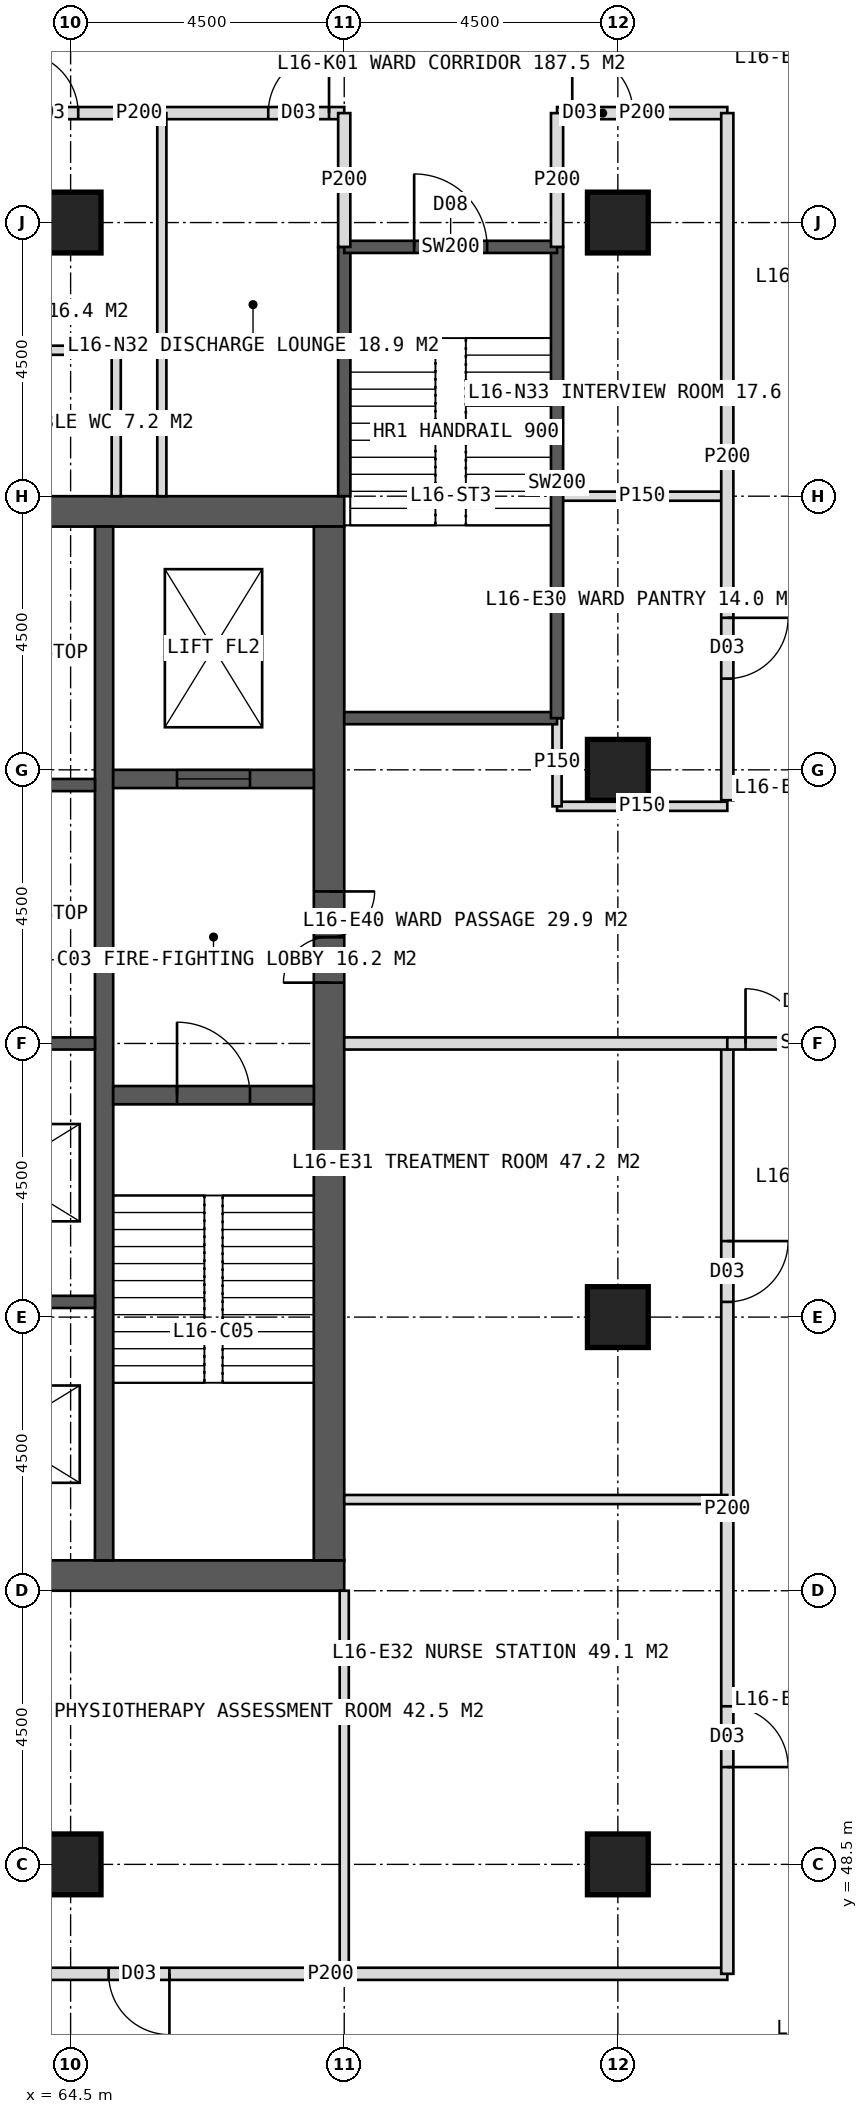
"""IFC4 building model, lengths in metres.
Left out: names, types, materials, properties, quantities, classifications, styles, units other than length and angle.
Written with IfcOpenShell. Run it as: python <this file> out.ifc"""

import sys

from ifc_helpers import new_model, si_unit, direction, frame, frame_2d, origin, origin_2d, place, context, subcontext, project, spatial, rectangle, hollow_rectangle, extrude, element, fill, save


model = new_model("IFC4")
c1 = context("Model", 3, precision=1e-05, world=origin(), true_north=direction((0.0, 1.0)))
c2 = subcontext(c1, "Body", "Model", "MODEL_VIEW")
j1 = project(units=[si_unit("LENGTHUNIT", "METRE"), si_unit("PLANEANGLEUNIT", "RADIAN")], contexts=[c1])
p1 = place(None, origin())
s1 = spatial("IfcSite", under=j1, at=p1, CompositionType="ELEMENT")
p2 = place(p1, origin())
s2 = spatial("IfcBuilding", under=s1, at=p2, CompositionType="ELEMENT")
p3 = place(p2, frame((0.0, 0.0, 71.0)))
s3 = spatial("IfcBuildingStorey", under=s2, at=p3, CompositionType="ELEMENT", Elevation=71.0)
p4 = place(p3, frame((51.0, 70.75, 0.0), z_axis=(0.0, 0.0, 1.0), x_axis=(1.0, 0.0, 0.0)))
e1 = element("IfcWall", 1, at=p4, inside=s3, PredefinedType="SHEAR", context=c2, shape_type="SweptSolid", body=[
    extrude(rectangle(XDim=18.0, YDim=0.5, at=frame_2d((9.0, 0.0))), origin(), (0.0, 0.0, 1.0), 4.0),
])
p5 = place(p4, frame((8.1, 0.0, 0.0)))
e2 = element("IfcOpeningElement", 2, at=p5, cuts=e1, PredefinedType="OPENING", context=c2, shape_type="SweptSolid", body=[
    extrude(rectangle(XDim=1.8, YDim=2.2, at=frame_2d((0.9, 1.1))), frame((0.0, 0.26, 0.0), z_axis=(0.0, -1.0, 0.0), x_axis=(1.0, 0.0, 0.0)), (0.0, 0.0, 1.0), 0.52),
])
p6 = place(p3, frame((51.0, 53.25, 0.0), z_axis=(0.0, 0.0, 1.0), x_axis=(1.0, 0.0, 0.0)))
e3 = element("IfcWall", 3, at=p6, inside=s3, PredefinedType="SHEAR", context=c2, shape_type="SweptSolid", body=[
    extrude(rectangle(XDim=18.0, YDim=0.5, at=frame_2d((9.0, 0.0))), origin(), (0.0, 0.0, 1.0), 4.0),
])
p7 = place(p6, frame((8.1, 0.0, 0.0)))
e4 = element("IfcOpeningElement", 4, at=p7, cuts=e3, PredefinedType="OPENING", context=c2, shape_type="SweptSolid", body=[
    extrude(rectangle(XDim=1.8, YDim=2.2, at=frame_2d((0.9, 1.1))), frame((0.0, 0.26, 0.0), z_axis=(0.0, -1.0, 0.0), x_axis=(1.0, 0.0, 0.0)), (0.0, 0.0, 1.0), 0.52),
])
p8 = place(p3, frame((68.75, 53.5, 0.0), z_axis=(0.0, 0.0, 1.0), x_axis=(0.0, 1.0, 0.0)))
e5 = element("IfcWall", 5, at=p8, inside=s3, PredefinedType="SHEAR", context=c2, shape_type="SweptSolid", body=[
    extrude(rectangle(XDim=17.0, YDim=0.5, at=frame_2d((8.5, 0.0))), origin(), (0.0, 0.0, 1.0), 4.0),
])
p9 = place(p8, frame((9.5, 0.0, 0.0)))
e6 = element("IfcOpeningElement", 6, at=p9, cuts=e5, PredefinedType="OPENING", context=c2, shape_type="SweptSolid", body=[
    extrude(rectangle(XDim=1.5, YDim=2.2, at=frame_2d((0.75, 1.1))), frame((0.0, 0.26, 0.0), z_axis=(0.0, -1.0, 0.0), x_axis=(1.0, 0.0, 0.0)), (0.0, 0.0, 1.0), 0.52),
])
p10 = place(p3, frame((65.05, 53.5, 0.0), z_axis=(0.0, 0.0, 1.0), x_axis=(0.0, 1.0, 0.0)))
e7 = element("IfcWall", 7, at=p10, inside=s3, PredefinedType="SHEAR", context=c2, shape_type="SweptSolid", body=[
    extrude(rectangle(XDim=17.0, YDim=0.3, at=frame_2d((8.5, 0.0))), origin(), (0.0, 0.0, 1.0), 4.0),
])
for number, where, z_axis, x_axis in (
    (8, (61.85, 57.75, 0.0), (0.0, 0.0, 1.0), (1.0, 0.0, 0.0)),
    (9, (61.85, 62.0, 0.0), (0.0, 0.0, 1.0), (1.0, 0.0, 0.0)),
    (10, (61.85, 66.25, 0.0), (0.0, 0.0, 1.0), (1.0, 0.0, 0.0)),
):
    element("IfcWall", number, at=place(p3, frame(where, z_axis=z_axis, x_axis=x_axis)), inside=s3, PredefinedType="SHEAR", context=c2, shape_type="SweptSolid", body=[
        extrude(rectangle(XDim=3.05, YDim=0.2, at=frame_2d((1.525, 0.0))), origin(), (0.0, 0.0, 1.0), 4.0),
    ])
p11 = place(p3, frame((65.2, 61.15, 0.0), z_axis=(0.0, 0.0, 1.0), x_axis=(1.0, 0.0, 0.0)))
e11 = element("IfcWall", 11, at=p11, inside=s3, PredefinedType="SHEAR", context=c2, shape_type="SweptSolid", body=[
    extrude(rectangle(XDim=3.3, YDim=0.3, at=frame_2d((1.65, 0.0))), origin(), (0.0, 0.0, 1.0), 4.0),
])
p12 = place(p11, frame((1.05, 0.0, 0.0)))
e12 = element("IfcOpeningElement", 12, at=p12, cuts=e11, PredefinedType="OPENING", context=c2, shape_type="SweptSolid", body=[
    extrude(rectangle(XDim=1.2, YDim=2.1, at=frame_2d((0.6, 1.05))), frame((0.0, 0.16, 0.0), z_axis=(0.0, -1.0, 0.0), x_axis=(1.0, 0.0, 0.0)), (0.0, 0.0, 1.0), 0.32),
])
p13 = place(p3, frame((65.2, 66.35, 0.0), z_axis=(0.0, 0.0, 1.0), x_axis=(1.0, 0.0, 0.0)))
e13 = element("IfcWall", 13, at=p13, inside=s3, PredefinedType="SHEAR", context=c2, shape_type="SweptSolid", body=[
    extrude(rectangle(XDim=3.3, YDim=0.3, at=frame_2d((1.65, 0.0))), origin(), (0.0, 0.0, 1.0), 4.0),
])
p14 = place(p13, frame((1.05, 0.0, 0.0)))
e14 = element("IfcOpeningElement", 14, at=p14, cuts=e13, PredefinedType="OPENING", context=c2, shape_type="SweptSolid", body=[
    extrude(rectangle(XDim=1.2, YDim=2.2, at=frame_2d((0.6, 1.1))), frame((0.0, 0.16, 0.0), z_axis=(0.0, -1.0, 0.0), x_axis=(1.0, 0.0, 0.0)), (0.0, 0.0, 1.0), 0.32),
])
for number, where, z_axis, x_axis in (
    (15, (73.5, 48.5, 0.0), (0.0, 0.0, 1.0), (1.0, 0.0, 0.0)),
    (16, (73.5, 75.5, 0.0), (0.0, 0.0, 1.0), (1.0, 0.0, 0.0)),
    (17, (64.5, 48.5, 0.0), (0.0, 0.0, 1.0), (1.0, 0.0, 0.0)),
    (18, (64.5, 75.5, 0.0), (0.0, 0.0, 1.0), (1.0, 0.0, 0.0)),
    (19, (73.5, 57.5, 0.0), (0.0, 0.0, 1.0), (1.0, 0.0, 0.0)),
    (20, (73.5, 66.5, 0.0), (0.0, 0.0, 1.0), (1.0, 0.0, 0.0)),
):
    element("IfcColumn", number, at=place(p3, frame(where, z_axis=z_axis, x_axis=x_axis)), inside=s3, PredefinedType="COLUMN", context=c2, shape_type="SweptSolid", body=[
        extrude(hollow_rectangle(XDim=1.0, YDim=1.0, WallThickness=0.1, at=origin_2d()), origin(), (0.0, 0.0, 1.0), 4.0),
    ])
p15 = place(p3, frame((62.25, 77.3, 0.0), z_axis=(0.0, 0.0, 1.0), x_axis=(1.0, 0.0, 0.0)))
e21 = element("IfcWall", 21, at=p15, inside=s3, PredefinedType="PARTITIONING", context=c2, shape_type="SweptSolid", body=[
    extrude(rectangle(XDim=6.75, YDim=0.2, at=frame_2d((3.375, 0.0))), origin(), (0.0, 0.0, 1.0), 3.75),
])
p16 = place(p15, frame((1.375, 0.0, 0.0)))
e22 = element("IfcOpeningElement", 22, at=p16, cuts=e21, PredefinedType="OPENING", context=c2, shape_type="SweptSolid", body=[
    extrude(rectangle(XDim=1.0, YDim=2.1, at=frame_2d((0.5, 1.05))), frame((0.0, 0.11, 0.0), z_axis=(0.0, -1.0, 0.0), x_axis=(1.0, 0.0, 0.0)), (0.0, 0.0, 1.0), 0.22),
])
p17 = place(p15, frame((5.5, 0.0, 0.0)))
e23 = element("IfcOpeningElement", 23, at=p17, cuts=e21, PredefinedType="OPENING", context=c2, shape_type="SweptSolid", body=[
    extrude(rectangle(XDim=1.0, YDim=2.1, at=frame_2d((0.5, 1.05))), frame((0.0, 0.11, 0.0), z_axis=(0.0, -1.0, 0.0), x_axis=(1.0, 0.0, 0.0)), (0.0, 0.0, 1.0), 0.22),
])
p18 = place(p3, frame((72.5, 77.3, 0.0), z_axis=(0.0, 0.0, 1.0), x_axis=(1.0, 0.0, 0.0)))
e24 = element("IfcWall", 24, at=p18, inside=s3, PredefinedType="PARTITIONING", context=c2, shape_type="SweptSolid", body=[
    extrude(rectangle(XDim=2.8, YDim=0.2, at=frame_2d((1.4, 0.0))), origin(), (0.0, 0.0, 1.0), 3.75),
])
p19 = place(p18, frame((0.25, 0.0, 0.0)))
e25 = element("IfcOpeningElement", 25, at=p19, cuts=e24, PredefinedType="OPENING", context=c2, shape_type="SweptSolid", body=[
    extrude(rectangle(XDim=1.0, YDim=2.1, at=frame_2d((0.5, 1.05))), frame((0.0, 0.11, 0.0), z_axis=(0.0, -1.0, 0.0), x_axis=(1.0, 0.0, 0.0)), (0.0, 0.0, 1.0), 0.22),
])
p20 = place(p3, frame((66.0, 71.0, 0.0), z_axis=(0.0, 0.0, 1.0), x_axis=(0.0, 1.0, 0.0)))
e26 = element("IfcWall", 26, at=p20, inside=s3, PredefinedType="PARTITIONING", context=c2, shape_type="SweptSolid", body=[
    extrude(rectangle(XDim=6.3, YDim=0.15, at=frame_2d((3.15, 0.0))), origin(), (0.0, 0.0, 1.0), 3.75),
])
p21 = place(p3, frame((62.25, 73.4, 0.0), z_axis=(0.0, 0.0, 1.0), x_axis=(1.0, 0.0, 0.0)))
e27 = element("IfcWall", 27, at=p21, inside=s3, PredefinedType="PARTITIONING", context=c2, shape_type="SweptSolid", body=[
    extrude(rectangle(XDim=3.0, YDim=0.15, at=frame_2d((1.5, 0.0))), origin(), (0.0, 0.0, 1.0), 3.75),
])
p22 = place(p3, frame((65.25, 71.0, 0.0), z_axis=(0.0, 0.0, 1.0), x_axis=(0.0, 1.0, 0.0)))
e28 = element("IfcWall", 28, at=p22, inside=s3, PredefinedType="PARTITIONING", context=c2, shape_type="SweptSolid", body=[
    extrude(rectangle(XDim=2.4, YDim=0.15, at=frame_2d((1.2, 0.0))), origin(), (0.0, 0.0, 1.0), 3.75),
])
p23 = place(p3, frame((69.0, 53.0, 0.0), z_axis=(0.0, 0.0, 1.0), x_axis=(0.0, -1.0, 0.0)))
e29 = element("IfcWall", 29, at=p23, inside=s3, PredefinedType="PARTITIONING", context=c2, shape_type="SweptSolid", body=[
    extrude(rectangle(XDim=6.3, YDim=0.15, at=frame_2d((3.15, 0.0))), origin(), (0.0, 0.0, 1.0), 3.75),
])
p24 = place(p3, frame((75.3, 46.7, 0.0), z_axis=(0.0, 0.0, 1.0), x_axis=(-1.0, 0.0, 0.0)))
e30 = element("IfcWall", 30, at=p24, inside=s3, PredefinedType="PARTITIONING", context=c2, shape_type="SweptSolid", body=[
    extrude(rectangle(XDim=13.05, YDim=0.2, at=frame_2d((6.525, 0.0))), origin(), (0.0, 0.0, 1.0), 3.75),
])
p25 = place(p24, frame((9.175, 0.0, 0.0)))
e31 = element("IfcOpeningElement", 31, at=p25, cuts=e30, PredefinedType="OPENING", context=c2, shape_type="SweptSolid", body=[
    extrude(rectangle(XDim=1.0, YDim=2.1, at=frame_2d((0.5, 1.05))), frame((0.0, 0.11, 0.0), z_axis=(0.0, -1.0, 0.0), x_axis=(1.0, 0.0, 0.0)), (0.0, 0.0, 1.0), 0.22),
])
p26 = place(p3, frame((72.5, 71.0, 0.0), z_axis=(0.0, 0.0, 1.0), x_axis=(1.0, 0.0, 0.0)))
e32 = element("IfcWall", 32, at=p26, inside=s3, PredefinedType="PARTITIONING", context=c2, shape_type="SweptSolid", body=[
    extrude(rectangle(XDim=2.8, YDim=0.15, at=frame_2d((1.4, 0.0))), origin(), (0.0, 0.0, 1.0), 3.75),
])
p27 = place(p3, frame((75.3, 77.3, 0.0), z_axis=(0.0, 0.0, 1.0), x_axis=(0.0, -1.0, 0.0)))
e33 = element("IfcWall", 33, at=p27, inside=s3, PredefinedType="PARTITIONING", context=c2, shape_type="SweptSolid", body=[
    extrude(rectangle(XDim=11.3, YDim=0.2, at=frame_2d((5.65, 0.0))), origin(), (0.0, 0.0, 1.0), 3.75),
])
p28 = place(p27, frame((8.3, 0.0, 0.0)))
e34 = element("IfcOpeningElement", 34, at=p28, cuts=e33, PredefinedType="OPENING", context=c2, shape_type="SweptSolid", body=[
    extrude(rectangle(XDim=1.0, YDim=2.1, at=frame_2d((0.5, 1.05))), frame((0.0, 0.11, 0.0), z_axis=(0.0, -1.0, 0.0), x_axis=(1.0, 0.0, 0.0)), (0.0, 0.0, 1.0), 0.22),
])
p29 = place(p3, frame((75.3, 62.0, 0.0), z_axis=(0.0, 0.0, 1.0), x_axis=(0.0, -1.0, 0.0)))
e35 = element("IfcWall", 35, at=p29, inside=s3, PredefinedType="PARTITIONING", context=c2, shape_type="SweptSolid", body=[
    extrude(rectangle(XDim=15.3, YDim=0.2, at=frame_2d((7.65, 0.0))), origin(), (0.0, 0.0, 1.0), 3.75),
])
p30 = place(p29, frame((3.25, 0.0, 0.0)))
e36 = element("IfcOpeningElement", 36, at=p30, cuts=e35, PredefinedType="OPENING", context=c2, shape_type="SweptSolid", body=[
    extrude(rectangle(XDim=1.0, YDim=2.1, at=frame_2d((0.5, 1.05))), frame((0.0, 0.11, 0.0), z_axis=(0.0, -1.0, 0.0), x_axis=(1.0, 0.0, 0.0)), (0.0, 0.0, 1.0), 0.22),
])
p31 = place(p29, frame((10.9, 0.0, 0.0)))
e37 = element("IfcOpeningElement", 37, at=p31, cuts=e35, PredefinedType="OPENING", context=c2, shape_type="SweptSolid", body=[
    extrude(rectangle(XDim=1.0, YDim=2.1, at=frame_2d((0.5, 1.05))), frame((0.0, 0.11, 0.0), z_axis=(0.0, -1.0, 0.0), x_axis=(1.0, 0.0, 0.0)), (0.0, 0.0, 1.0), 0.22),
])
p32 = place(p3, frame((72.5, 65.9, 0.0), z_axis=(0.0, 0.0, 1.0), x_axis=(1.0, 0.0, 0.0)))
e38 = element("IfcWall", 38, at=p32, inside=s3, PredefinedType="PARTITIONING", context=c2, shape_type="SweptSolid", body=[
    extrude(rectangle(XDim=2.8, YDim=0.15, at=frame_2d((1.4, 0.0))), origin(), (0.0, 0.0, 1.0), 3.75),
])
p33 = place(p3, frame((69.0, 62.0, 0.0), z_axis=(0.0, 0.0, 1.0), x_axis=(1.0, 0.0, 0.0)))
e39 = element("IfcWall", 39, at=p33, inside=s3, PredefinedType="SOLIDWALL", context=c2, shape_type="SweptSolid", body=[
    extrude(rectangle(XDim=6.3, YDim=0.2, at=frame_2d((3.15, 0.0))), origin(), (0.0, 0.0, 1.0), 2.75),
])
p34 = place(p3, frame((69.0, 54.5, 0.0), z_axis=(0.0, 0.0, 1.0), x_axis=(1.0, 0.0, 0.0)))
e40 = element("IfcWall", 40, at=p34, inside=s3, PredefinedType="PARTITIONING", context=c2, shape_type="SweptSolid", body=[
    extrude(rectangle(XDim=6.3, YDim=0.15, at=frame_2d((3.15, 0.0))), origin(), (0.0, 0.0, 1.0), 3.75),
])
p35 = place(p3, frame((75.3, 62.0, 0.0), z_axis=(0.0, 0.0, 1.0), x_axis=(1.0, 0.0, 0.0)))
e41 = element("IfcWall", 41, at=p35, inside=s3, PredefinedType="SOLIDWALL", context=c2, shape_type="SweptSolid", body=[
    extrude(rectangle(XDim=2.7, YDim=0.2, at=frame_2d((1.35, 0.0))), origin(), (0.0, 0.0, 1.0), 2.75),
])
p36 = place(p35, frame((0.3, 0.0, 0.0)))
e42 = element("IfcOpeningElement", 42, at=p36, cuts=e41, PredefinedType="OPENING", context=c2, shape_type="SweptSolid", body=[
    extrude(rectangle(XDim=1.8, YDim=2.2, at=frame_2d((0.9, 1.1))), frame((0.0, 0.11, 0.0), z_axis=(0.0, -1.0, 0.0), x_axis=(1.0, 0.0, 0.0)), (0.0, 0.0, 1.0), 0.22),
])
p37 = place(p3, frame((72.5, 65.9, 0.0), z_axis=(0.0, 0.0, 1.0), x_axis=(0.0, 1.0, 0.0)))
e43 = element("IfcWall", 43, at=p37, inside=s3, PredefinedType="PARTITIONING", context=c2, shape_type="SweptSolid", body=[
    extrude(rectangle(XDim=1.45, YDim=0.15, at=frame_2d((0.725, 0.0))), origin(), (0.0, 0.0, 1.0), 3.75),
])
p38 = place(p3, frame((69.0, 71.0, 0.0), z_axis=(0.0, 0.0, 1.0), x_axis=(0.0, 1.0, 0.0)))
e44 = element("IfcWall", 44, at=p38, inside=s3, PredefinedType="SOLIDWALL", context=c2, shape_type="SweptSolid", body=[
    extrude(rectangle(XDim=4.1, YDim=0.2, at=frame_2d((2.05, 0.0))), origin(), (0.0, 0.0, 1.0), 3.75),
])
p39 = place(p3, frame((69.0, 67.35, 0.0), z_axis=(0.0, 0.0, 1.0), x_axis=(1.0, 0.0, 0.0)))
e45 = element("IfcWall", 45, at=p39, inside=s3, PredefinedType="SOLIDWALL", context=c2, shape_type="SweptSolid", body=[
    extrude(rectangle(XDim=3.5, YDim=0.2, at=frame_2d((1.75, 0.0))), origin(), (0.0, 0.0, 1.0), 3.75),
])
p40 = place(p3, frame((72.5, 67.35, 0.0), z_axis=(0.0, 0.0, 1.0), x_axis=(0.0, 1.0, 0.0)))
e46 = element("IfcWall", 46, at=p40, inside=s3, PredefinedType="SOLIDWALL", context=c2, shape_type="SweptSolid", body=[
    extrude(rectangle(XDim=7.75, YDim=0.2, at=frame_2d((3.875, 0.0))), origin(), (0.0, 0.0, 1.0), 3.75),
])
p41 = place(p3, frame((69.0, 75.1, 0.0), z_axis=(0.0, 0.0, 1.0), x_axis=(1.0, 0.0, 0.0)))
e47 = element("IfcWall", 47, at=p41, inside=s3, PredefinedType="SOLIDWALL", context=c2, shape_type="SweptSolid", body=[
    extrude(rectangle(XDim=3.5, YDim=0.2, at=frame_2d((1.75, 0.0))), origin(), (0.0, 0.0, 1.0), 3.75),
])
p42 = place(p41, frame((1.15, 0.0, 0.0)))
e48 = element("IfcOpeningElement", 48, at=p42, cuts=e47, PredefinedType="OPENING", context=c2, shape_type="SweptSolid", body=[
    extrude(rectangle(XDim=1.2, YDim=2.1, at=frame_2d((0.6, 1.05))), frame((0.0, 0.11, 0.0), z_axis=(0.0, -1.0, 0.0), x_axis=(1.0, 0.0, 0.0)), (0.0, 0.0, 1.0), 0.22),
])
for number, where, z_axis, x_axis in (
    (49, (69.0, 75.1, 0.0), (0.0, 0.0, 1.0), (0.0, 1.0, 0.0)),
    (50, (72.5, 75.1, 0.0), (0.0, 0.0, 1.0), (0.0, 1.0, 0.0)),
):
    element("IfcWall", number, at=place(p3, frame(where, z_axis=z_axis, x_axis=x_axis)), inside=s3, PredefinedType="PARTITIONING", context=c2, shape_type="SweptSolid", body=[
        extrude(rectangle(XDim=2.2, YDim=0.2, at=frame_2d((1.1, 0.0))), origin(), (0.0, 0.0, 1.0), 3.75),
    ])
p43 = place(p16, origin())
e51 = element("IfcDoor", 51, at=p43, inside=s3, OperationType="SINGLE_SWING_LEFT", PredefinedType="DOOR", context=c2, shape_type="SweptSolid", body=[
    extrude(rectangle(XDim=1.0, YDim=2.1, at=frame_2d((0.5, 1.05))), frame((0.0, 0.025, 0.0), z_axis=(0.0, -1.0, 0.0), x_axis=(1.0, 0.0, 0.0)), (0.0, 0.0, 1.0), 0.05),
])
fill(e22, e51)
p44 = place(p17, origin())
e52 = element("IfcDoor", 52, at=p44, inside=s3, OperationType="SINGLE_SWING_RIGHT", PredefinedType="DOOR", context=c2, shape_type="SweptSolid", body=[
    extrude(rectangle(XDim=1.0, YDim=2.1, at=frame_2d((0.5, 1.05))), frame((0.0, 0.025, 0.0), z_axis=(0.0, -1.0, 0.0), x_axis=(1.0, 0.0, 0.0)), (0.0, 0.0, 1.0), 0.05),
])
fill(e23, e52)
p45 = place(p19, origin())
e53 = element("IfcDoor", 53, at=p45, inside=s3, OperationType="SINGLE_SWING_LEFT", PredefinedType="DOOR", context=c2, shape_type="SweptSolid", body=[
    extrude(rectangle(XDim=1.0, YDim=2.1, at=frame_2d((0.5, 1.05))), frame((0.0, 0.025, 0.0), z_axis=(0.0, -1.0, 0.0), x_axis=(1.0, 0.0, 0.0)), (0.0, 0.0, 1.0), 0.05),
])
fill(e25, e53)
p46 = place(p25, origin())
e54 = element("IfcDoor", 54, at=p46, inside=s3, OperationType="SINGLE_SWING_LEFT", PredefinedType="DOOR", context=c2, shape_type="SweptSolid", body=[
    extrude(rectangle(XDim=1.0, YDim=2.1, at=frame_2d((0.5, 1.05))), frame((0.0, 0.025, 0.0), z_axis=(0.0, -1.0, 0.0), x_axis=(1.0, 0.0, 0.0)), (0.0, 0.0, 1.0), 0.05),
])
fill(e31, e54)
p47 = place(p28, origin())
e55 = element("IfcDoor", 55, at=p47, inside=s3, OperationType="SINGLE_SWING_LEFT", PredefinedType="DOOR", context=c2, shape_type="SweptSolid", body=[
    extrude(rectangle(XDim=1.0, YDim=2.1, at=frame_2d((0.5, 1.05))), frame((0.0, 0.025, 0.0), z_axis=(0.0, -1.0, 0.0), x_axis=(1.0, 0.0, 0.0)), (0.0, 0.0, 1.0), 0.05),
])
fill(e34, e55)
p48 = place(p30, origin())
e56 = element("IfcDoor", 56, at=p48, inside=s3, OperationType="SINGLE_SWING_LEFT", PredefinedType="DOOR", context=c2, shape_type="SweptSolid", body=[
    extrude(rectangle(XDim=1.0, YDim=2.1, at=frame_2d((0.5, 1.05))), frame((0.0, 0.025, 0.0), z_axis=(0.0, -1.0, 0.0), x_axis=(1.0, 0.0, 0.0)), (0.0, 0.0, 1.0), 0.05),
])
fill(e36, e56)
p49 = place(p31, origin())
e57 = element("IfcDoor", 57, at=p49, inside=s3, OperationType="SINGLE_SWING_RIGHT", PredefinedType="DOOR", context=c2, shape_type="SweptSolid", body=[
    extrude(rectangle(XDim=1.0, YDim=2.1, at=frame_2d((0.5, 1.05))), frame((0.0, 0.025, 0.0), z_axis=(0.0, -1.0, 0.0), x_axis=(1.0, 0.0, 0.0)), (0.0, 0.0, 1.0), 0.05),
])
fill(e37, e57)
p50 = place(p36, origin())
e58 = element("IfcDoor", 58, at=p50, inside=s3, OperationType="DOUBLE_DOOR_DOUBLE_SWING", PredefinedType="DOOR", context=c2, shape_type="SweptSolid", body=[
    extrude(rectangle(XDim=1.8, YDim=2.2, at=frame_2d((0.9, 1.1))), frame((0.0, 0.025, 0.0), z_axis=(0.0, -1.0, 0.0), x_axis=(1.0, 0.0, 0.0)), (0.0, 0.0, 1.0), 0.05),
])
fill(e42, e58)
p51 = place(p9, origin())
e59 = element("IfcDoor", 59, at=p51, inside=s3, OperationType="DOUBLE_DOOR_SINGLE_SWING", PredefinedType="DOOR", context=c2, shape_type="SweptSolid", body=[
    extrude(rectangle(XDim=1.5, YDim=2.2, at=frame_2d((0.75, 1.1))), frame((0.0, 0.025, 0.0), z_axis=(0.0, -1.0, 0.0), x_axis=(1.0, 0.0, 0.0)), (0.0, 0.0, 1.0), 0.05),
])
fill(e6, e59)
p52 = place(p12, origin())
e60 = element("IfcDoor", 60, at=p52, inside=s3, OperationType="SINGLE_SWING_LEFT", PredefinedType="DOOR", context=c2, shape_type="SweptSolid", body=[
    extrude(rectangle(XDim=1.2, YDim=2.1, at=frame_2d((0.6, 1.05))), frame((0.0, 0.025, 0.0), z_axis=(0.0, -1.0, 0.0), x_axis=(1.0, 0.0, 0.0)), (0.0, 0.0, 1.0), 0.05),
])
fill(e12, e60)
p53 = place(p14, origin())
e61 = element("IfcDoor", 61, at=p53, inside=s3, OperationType="SLIDING_TO_LEFT", PredefinedType="DOOR", context=c2, shape_type="SweptSolid", body=[
    extrude(rectangle(XDim=1.2, YDim=2.2, at=frame_2d((0.6, 1.1))), frame((0.0, 0.025, 0.0), z_axis=(0.0, -1.0, 0.0), x_axis=(1.0, 0.0, 0.0)), (0.0, 0.0, 1.0), 0.05),
])
fill(e14, e61)
p54 = place(p42, origin())
e62 = element("IfcDoor", 62, at=p54, inside=s3, OperationType="SINGLE_SWING_LEFT", PredefinedType="DOOR", context=c2, shape_type="SweptSolid", body=[
    extrude(rectangle(XDim=1.2, YDim=2.1, at=frame_2d((0.6, 1.05))), frame((0.0, 0.025, 0.0), z_axis=(0.0, -1.0, 0.0), x_axis=(1.0, 0.0, 0.0)), (0.0, 0.0, 1.0), 0.05),
])
fill(e48, e62)
save(model, sys.argv[1])
